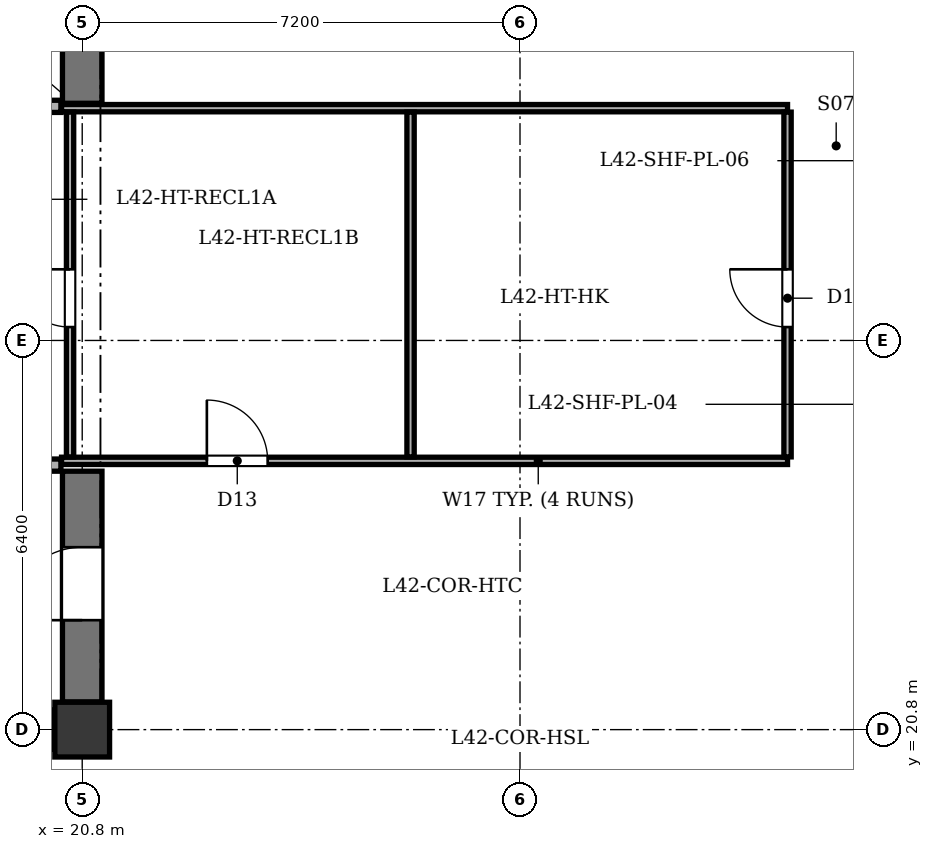
"""IFC4 building model, lengths in metres.
Left out: names, types, materials, properties, quantities, classifications, styles, units other than length and angle.
Written with IfcOpenShell. Run it as: python <this file> out.ifc"""

import sys

from ifc_helpers import new_model, si_unit, direction, frame, frame_2d, origin, origin_2d, place, context, subcontext, project, spatial, rectangle, extrude, element, fill, save


model = new_model("IFC4")
c1 = context("Model", 3, precision=1e-05, world=origin(), true_north=direction((0.0, 1.0)))
c2 = subcontext(c1, "Body", "Model", "MODEL_VIEW")
j1 = project(units=[si_unit("LENGTHUNIT", "METRE"), si_unit("PLANEANGLEUNIT", "RADIAN")], contexts=[c1])
p1 = place(None, origin())
s1 = spatial("IfcSite", under=j1, at=p1, CompositionType="ELEMENT")
p2 = place(p1, origin())
s2 = spatial("IfcBuilding", under=s1, at=p2, CompositionType="ELEMENT")
p3 = place(p2, frame((0.0, 0.0, 165.8)))
s3 = spatial("IfcBuildingStorey", under=s2, at=p3, CompositionType="ELEMENT", Elevation=165.8)
p4 = place(p3, frame((20.8, 20.8, 0.0), z_axis=(0.0, 0.0, 1.0), x_axis=(1.0, 0.0, 0.0)))
e1 = element("IfcColumn", 1, at=p4, inside=s3, PredefinedType="COLUMN", context=c2, shape_type="SweptSolid", body=[
    extrude(rectangle(XDim=0.9, YDim=0.9, at=origin_2d()), origin(), (0.0, 0.0, 1.0), 3.5),
])
p5 = place(p3, frame((13.255, 20.8, 0.0), z_axis=(0.0, 0.0, 1.0), x_axis=(1.0, 0.0, 0.0)))
e2 = element("IfcWall", 2, at=p5, inside=s3, PredefinedType="SHEAR", context=c2, shape_type="SweptSolid", body=[
    extrude(rectangle(XDim=7.09, YDim=0.65, at=frame_2d((3.545, 0.0))), origin(), (0.0, 0.0, 1.0), 3.2),
])
p6 = place(p3, frame((20.8, 21.255, 0.0), z_axis=(0.0, 0.0, 1.0), x_axis=(0.0, 1.0, 0.0)))
e3 = element("IfcWall", 3, at=p6, inside=s3, PredefinedType="SHEAR", context=c2, shape_type="SweptSolid", body=[
    extrude(rectangle(XDim=3.795, YDim=0.65, at=frame_2d((1.897, 0.0))), origin(), (0.0, 0.0, 1.0), 3.2),
])
p7 = place(p6, frame((1.345, 0.0, 0.0)))
e4 = element("IfcOpeningElement", 4, at=p7, cuts=e3, PredefinedType="OPENING", context=c2, shape_type="SweptSolid", body=[
    extrude(rectangle(XDim=1.2, YDim=2.15, at=frame_2d((0.6, 1.075))), frame((0.0, 0.335, 0.0), z_axis=(0.0, -1.0, 0.0), x_axis=(1.0, 0.0, 0.0)), (0.0, 0.0, 1.0), 0.67),
])
p8 = place(p3, frame((20.8, 31.1, 0.0), z_axis=(0.0, 0.0, 1.0), x_axis=(0.0, 1.0, 0.0)))
e5 = element("IfcWall", 5, at=p8, inside=s3, PredefinedType="SHEAR", context=c2, shape_type="SweptSolid", body=[
    extrude(rectangle(XDim=2.045, YDim=0.65, at=frame_2d((1.022, 0.0))), origin(), (0.0, 0.0, 1.0), 3.2),
])
for number, where, z_axis, x_axis in (
    (6, (16.6, 25.15, 0.0), (0.0, 0.0, 1.0), (1.0, 0.0, 0.0)),
    (7, (16.6, 31.05, 0.0), (0.0, 0.0, 1.0), (1.0, 0.0, 0.0)),
):
    element("IfcWall", number, at=place(p3, frame(where, z_axis=z_axis, x_axis=x_axis)), inside=s3, PredefinedType="SOLIDWALL", context=c2, shape_type="SweptSolid", body=[
        extrude(rectangle(XDim=3.85, YDim=0.2, at=frame_2d((1.925, 0.0))), origin(), (0.0, 0.0, 1.0), 3.2),
    ])
p9 = place(p3, frame((20.46, 25.22, 0.0), z_axis=(0.0, 0.0, 1.0), x_axis=(1.0, 0.0, 0.0)))
e8 = element("IfcWall", 8, at=p9, inside=s3, PredefinedType="PARTITIONING", context=c2, shape_type="SweptSolid", body=[
    extrude(rectangle(XDim=11.94, YDim=0.12, at=frame_2d((5.97, 0.0))), origin(), (0.0, 0.0, 1.0), 3.2),
])
p10 = place(p9, frame((2.39, 0.0, 0.0)))
e9 = element("IfcOpeningElement", 9, at=p10, cuts=e8, PredefinedType="OPENING", context=c2, shape_type="SweptSolid", body=[
    extrude(rectangle(XDim=1.0, YDim=2.1, at=frame_2d((0.5, 1.05))), frame((0.0, 0.07, 0.0), z_axis=(0.0, -1.0, 0.0), x_axis=(1.0, 0.0, 0.0)), (0.0, 0.0, 1.0), 0.14),
])
p11 = place(p3, frame((20.46, 31.02, 0.0), z_axis=(0.0, 0.0, 1.0), x_axis=(1.0, 0.0, 0.0)))
e10 = element("IfcWall", 10, at=p11, inside=s3, PredefinedType="PARTITIONING", context=c2, shape_type="SweptSolid", body=[
    extrude(rectangle(XDim=11.94, YDim=0.12, at=frame_2d((5.97, 0.0))), origin(), (0.0, 0.0, 1.0), 3.2),
])
p12 = place(p3, frame((32.4, 25.285, 0.0), z_axis=(0.0, 0.0, 1.0), x_axis=(0.0, 1.0, 0.0)))
e11 = element("IfcWall", 11, at=p12, inside=s3, PredefinedType="PARTITIONING", context=c2, shape_type="SweptSolid", body=[
    extrude(rectangle(XDim=5.67, YDim=0.12, at=frame_2d((2.835, 0.0))), origin(), (0.0, 0.0, 1.0), 3.2),
])
p13 = place(p12, frame((2.135, 0.0, 0.0)))
e12 = element("IfcOpeningElement", 12, at=p13, cuts=e11, PredefinedType="OPENING", context=c2, shape_type="SweptSolid", body=[
    extrude(rectangle(XDim=0.95, YDim=2.1, at=frame_2d((0.475, 1.05))), frame((0.0, 0.07, 0.0), z_axis=(0.0, -1.0, 0.0), x_axis=(1.0, 0.0, 0.0)), (0.0, 0.0, 1.0), 0.14),
])
p14 = place(p3, frame((20.6, 25.285, 0.0), z_axis=(0.0, 0.0, 1.0), x_axis=(0.0, 1.0, 0.0)))
e13 = element("IfcWall", 13, at=p14, inside=s3, PredefinedType="PARTITIONING", context=c2, shape_type="SweptSolid", body=[
    extrude(rectangle(XDim=5.67, YDim=0.12, at=frame_2d((2.835, 0.0))), origin(), (0.0, 0.0, 1.0), 2.735),
])
p15 = place(p14, frame((2.135, 0.0, 0.0)))
e14 = element("IfcOpeningElement", 14, at=p15, cuts=e13, PredefinedType="OPENING", context=c2, shape_type="SweptSolid", body=[
    extrude(rectangle(XDim=0.95, YDim=2.1, at=frame_2d((0.475, 1.05))), frame((0.0, 0.07, 0.0), z_axis=(0.0, -1.0, 0.0), x_axis=(1.0, 0.0, 0.0)), (0.0, 0.0, 1.0), 0.14),
])
p16 = place(p3, frame((26.2, 25.285, 0.0), z_axis=(0.0, 0.0, 1.0), x_axis=(0.0, 1.0, 0.0)))
e15 = element("IfcWall", 15, at=p16, inside=s3, PredefinedType="PARTITIONING", context=c2, shape_type="SweptSolid", body=[
    extrude(rectangle(XDim=5.67, YDim=0.12, at=frame_2d((2.835, 0.0))), origin(), (0.0, 0.0, 1.0), 3.2),
])
p17 = place(p7, origin())
e16 = element("IfcDoor", 16, at=p17, inside=s3, OperationType="SINGLE_SWING_LEFT", PredefinedType="DOOR", context=c2, shape_type="SweptSolid", body=[
    extrude(rectangle(XDim=1.2, YDim=2.15, at=frame_2d((0.6, 1.075))), frame((0.0, 0.025, 0.0), z_axis=(0.0, -1.0, 0.0), x_axis=(1.0, 0.0, 0.0)), (0.0, 0.0, 1.0), 0.05),
])
fill(e4, e16)
p18 = place(p15, origin())
e17 = element("IfcDoor", 17, at=p18, inside=s3, OperationType="SINGLE_SWING_RIGHT", PredefinedType="DOOR", context=c2, shape_type="SweptSolid", body=[
    extrude(rectangle(XDim=0.95, YDim=2.1, at=frame_2d((0.475, 1.05))), frame((0.0, 0.025, 0.0), z_axis=(0.0, -1.0, 0.0), x_axis=(1.0, 0.0, 0.0)), (0.0, 0.0, 1.0), 0.05),
])
fill(e14, e17)
p19 = place(p10, origin())
e18 = element("IfcDoor", 18, at=p19, inside=s3, OperationType="SINGLE_SWING_LEFT", PredefinedType="DOOR", context=c2, shape_type="SweptSolid", body=[
    extrude(rectangle(XDim=1.0, YDim=2.1, at=frame_2d((0.5, 1.05))), frame((0.0, 0.025, 0.0), z_axis=(0.0, -1.0, 0.0), x_axis=(1.0, 0.0, 0.0)), (0.0, 0.0, 1.0), 0.05),
])
fill(e9, e18)
p20 = place(p13, origin())
e19 = element("IfcDoor", 19, at=p20, inside=s3, OperationType="SINGLE_SWING_RIGHT", PredefinedType="DOOR", context=c2, shape_type="SweptSolid", body=[
    extrude(rectangle(XDim=0.95, YDim=2.1, at=frame_2d((0.475, 1.05))), frame((0.0, 0.025, 0.0), z_axis=(0.0, -1.0, 0.0), x_axis=(1.0, 0.0, 0.0)), (0.0, 0.0, 1.0), 0.05),
])
fill(e12, e19)
save(model, sys.argv[1])
